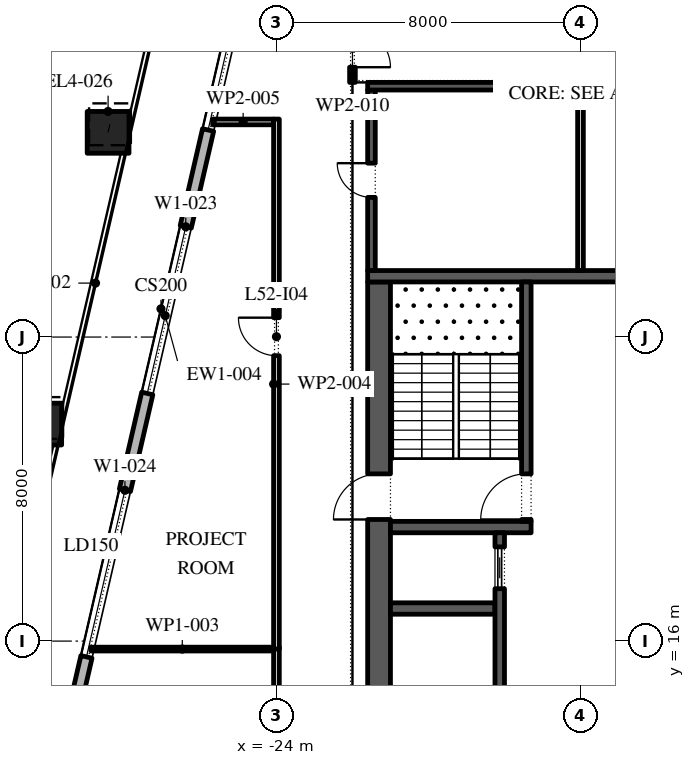
"""IFC4 building model, lengths in metres.
Left out: names, types, materials, properties, quantities, classifications, styles, units other than length and angle.
Written with IfcOpenShell. Run it as: python <this file> out.ifc"""

import sys

from ifc_helpers import new_model, si_unit, direction, frame, frame_2d, origin, origin_2d, place, context, subcontext, project, spatial, rectangle, extrude, element, fill, save


model = new_model("IFC4")
c1 = context("Model", 3, precision=1e-05, world=origin(), true_north=direction((0.0, 1.0)))
c2 = subcontext(c1, "Body", "Model", "MODEL_VIEW")
j1 = project(units=[si_unit("LENGTHUNIT", "METRE"), si_unit("PLANEANGLEUNIT", "RADIAN")], contexts=[c1])
p1 = place(None, origin())
s1 = spatial("IfcSite", under=j1, at=p1, CompositionType="ELEMENT")
p2 = place(p1, origin())
s2 = spatial("IfcBuilding", under=s1, at=p2, CompositionType="ELEMENT")
p3 = place(p2, frame((0.0, 0.0, 243.0)))
s3 = spatial("IfcBuildingStorey", under=s2, at=p3, CompositionType="ELEMENT", Elevation=243.0)
p4 = place(p3, frame((-28.43, 29.386, 0.0), z_axis=(0.011610223917, 0.050562525159, 0.998653410223), x_axis=(-0.974635787342, 0.223796966095, 0.0)))
e1 = element("IfcColumn", 1, at=p4, inside=s3, PredefinedType="COLUMN", context=c2, shape_type="SweptSolid", body=[
    extrude(rectangle(XDim=1.1, YDim=1.1, at=origin_2d()), origin(), (0.0, 0.0, 1.0), 4.206),
])
p5 = place(p3, frame((-30.202, 21.71, 0.0), z_axis=(0.00871280379, 0.037929739166, 0.999242424008), x_axis=(-0.974617095667, 0.223878352757, 0.0)))
e2 = element("IfcColumn", 2, at=p5, inside=s3, PredefinedType="COLUMN", context=c2, shape_type="SweptSolid", body=[
    extrude(rectangle(XDim=1.1, YDim=1.1, at=origin_2d()), origin(), (0.0, 0.0, 1.0), 4.203),
])
p6 = place(p3, frame((-21.359, 48.678, 0.0), z_axis=(0.0, 0.0, 1.0), x_axis=(-0.224949198343, -0.974370493275, 0.0)))
e3 = element("IfcWall", 3, at=p6, inside=s3, PredefinedType="STANDARD", context=c2, shape_type="SweptSolid", body=[
    extrude(rectangle(XDim=49.5, YDim=0.3, at=frame_2d((24.75, 0.0))), origin(), (0.0, 0.0, 1.0), 4.0),
])
p7 = place(p6, frame((1.157, 0.0, 0.45)))
e4 = element("IfcOpeningElement", 4, at=p7, cuts=e3, PredefinedType="OPENING", context=c2, shape_type="SweptSolid", body=[
    extrude(rectangle(XDim=4.5, YDim=3.05, at=frame_2d((2.25, 1.525))), frame((0.0, 0.16, 0.0), z_axis=(0.0, -1.0, 0.0), x_axis=(1.0, 0.0, 0.0)), (0.0, 0.0, 1.0), 0.32),
])
p8 = place(p6, frame((9.171, 0.0, 0.0)))
e5 = element("IfcOpeningElement", 5, at=p8, cuts=e3, PredefinedType="OPENING", context=c2, shape_type="SweptSolid", body=[
    extrude(rectangle(XDim=2.4, YDim=3.5, at=frame_2d((1.2, 1.75))), frame((0.0, 0.16, 0.0), z_axis=(0.0, -1.0, 0.0), x_axis=(1.0, 0.0, 0.0)), (0.0, 0.0, 1.0), 0.32),
])
p9 = place(p6, frame((15.236, 0.0, 0.45)))
e6 = element("IfcOpeningElement", 6, at=p9, cuts=e3, PredefinedType="OPENING", context=c2, shape_type="SweptSolid", body=[
    extrude(rectangle(XDim=4.5, YDim=3.05, at=frame_2d((2.25, 1.525))), frame((0.0, 0.16, 0.0), z_axis=(0.0, -1.0, 0.0), x_axis=(1.0, 0.0, 0.0)), (0.0, 0.0, 1.0), 0.32),
])
p10 = place(p6, frame((22.35, 0.0, 0.45)))
e7 = element("IfcOpeningElement", 7, at=p10, cuts=e3, PredefinedType="OPENING", context=c2, shape_type="SweptSolid", body=[
    extrude(rectangle(XDim=4.5, YDim=3.05, at=frame_2d((2.25, 1.525))), frame((0.0, 0.16, 0.0), z_axis=(0.0, -1.0, 0.0), x_axis=(1.0, 0.0, 0.0)), (0.0, 0.0, 1.0), 0.32),
])
p11 = place(p6, frame((29.464, 0.0, 0.45)))
e8 = element("IfcOpeningElement", 8, at=p11, cuts=e3, PredefinedType="OPENING", context=c2, shape_type="SweptSolid", body=[
    extrude(rectangle(XDim=4.5, YDim=3.05, at=frame_2d((2.25, 1.525))), frame((0.0, 0.16, 0.0), z_axis=(0.0, -1.0, 0.0), x_axis=(1.0, 0.0, 0.0)), (0.0, 0.0, 1.0), 0.32),
])
p12 = place(p6, frame((37.628, 0.0, 0.0)))
e9 = element("IfcOpeningElement", 9, at=p12, cuts=e3, PredefinedType="OPENING", context=c2, shape_type="SweptSolid", body=[
    extrude(rectangle(XDim=2.4, YDim=3.325, at=frame_2d((1.2, 1.663))), frame((0.0, 0.16, 0.0), z_axis=(0.0, -1.0, 0.0), x_axis=(1.0, 0.0, 0.0)), (0.0, 0.0, 1.0), 0.32),
])
p13 = place(p6, frame((43.693, 0.0, 0.45)))
e10 = element("IfcOpeningElement", 10, at=p13, cuts=e3, PredefinedType="OPENING", context=c2, shape_type="SweptSolid", body=[
    extrude(rectangle(XDim=4.5, YDim=2.825, at=frame_2d((2.25, 1.413))), frame((0.0, 0.16, 0.0), z_axis=(0.0, -1.0, 0.0), x_axis=(1.0, 0.0, 0.0)), (0.0, 0.0, 1.0), 0.32),
])
p14 = place(p3, frame((-21.3, -2.45, 0.0), z_axis=(0.0, 0.0, 1.0), x_axis=(0.0, 1.0, 0.0)))
e11 = element("IfcWall", 11, at=p14, inside=s3, PredefinedType="SHEAR", context=c2, shape_type="SweptSolid", body=[
    extrude(rectangle(XDim=27.9, YDim=0.6, at=frame_2d((13.95, 0.0))), origin(), (0.0, 0.0, 1.0), 4.0),
])
p15 = place(p14, frame((5.05, 0.0, 0.0)))
e12 = element("IfcOpeningElement", 12, at=p15, cuts=e11, PredefinedType="OPENING", context=c2, shape_type="SweptSolid", body=[
    extrude(rectangle(XDim=1.2, YDim=2.1, at=frame_2d((0.6, 1.05))), frame((0.0, 0.31, 0.0), z_axis=(0.0, -1.0, 0.0), x_axis=(1.0, 0.0, 0.0)), (0.0, 0.0, 1.0), 0.62),
])
p16 = place(p14, frame((21.65, 0.0, 0.0)))
e13 = element("IfcOpeningElement", 13, at=p16, cuts=e11, PredefinedType="OPENING", context=c2, shape_type="SweptSolid", body=[
    extrude(rectangle(XDim=1.2, YDim=2.1, at=frame_2d((0.6, 1.05))), frame((0.0, 0.31, 0.0), z_axis=(0.0, -1.0, 0.0), x_axis=(1.0, 0.0, 0.0)), (0.0, 0.0, 1.0), 0.62),
])
p17 = place(p3, frame((-21.6, 25.6, 0.0), z_axis=(0.0, 0.0, 1.0), x_axis=(1.0, 0.0, 0.0)))
e14 = element("IfcWall", 14, at=p17, inside=s3, PredefinedType="SHEAR", context=c2, shape_type="SweptSolid", body=[
    extrude(rectangle(XDim=11.2, YDim=0.3, at=frame_2d((5.6, 0.0))), origin(), (0.0, 0.0, 1.0), 4.0),
])
p18 = place(p3, frame((-21.0, 19.0, 0.0), z_axis=(0.0, 0.0, 1.0), x_axis=(1.0, 0.0, 0.0)))
e15 = element("IfcWall", 15, at=p18, inside=s3, PredefinedType="SHEAR", context=c2, shape_type="SweptSolid", body=[
    extrude(rectangle(XDim=3.7, YDim=0.3, at=frame_2d((1.85, 0.0))), origin(), (0.0, 0.0, 1.0), 4.0),
])
p19 = place(p3, frame((-17.425, 19.15, 0.0), z_axis=(0.0, 0.0, 1.0), x_axis=(0.0, 1.0, 0.0)))
e16 = element("IfcWall", 16, at=p19, inside=s3, PredefinedType="SHEAR", context=c2, shape_type="SweptSolid", body=[
    extrude(rectangle(XDim=6.3, YDim=0.25, at=frame_2d((3.15, 0.0))), origin(), (0.0, 0.0, 1.0), 4.0),
])
p20 = place(p19, frame((0.05, 0.0, 0.0)))
e17 = element("IfcOpeningElement", 17, at=p20, cuts=e16, PredefinedType="OPENING", context=c2, shape_type="SweptSolid", body=[
    extrude(rectangle(XDim=1.2, YDim=2.1, at=frame_2d((0.6, 1.05))), frame((0.0, 0.135, 0.0), z_axis=(0.0, -1.0, 0.0), x_axis=(1.0, 0.0, 0.0)), (0.0, 0.0, 1.0), 0.27),
])
p21 = place(p3, frame((-21.0, 16.857, 0.0), z_axis=(0.0, 0.0, 1.0), x_axis=(1.0, 0.0, 0.0)))
e18 = element("IfcWall", 18, at=p21, inside=s3, PredefinedType="SHEAR", context=c2, shape_type="SweptSolid", body=[
    extrude(rectangle(XDim=2.75, YDim=0.3, at=frame_2d((1.375, 0.0))), origin(), (0.0, 0.0, 1.0), 4.0),
])
p22 = place(p3, frame((-18.125, 4.15, 0.0), z_axis=(0.0, 0.0, 1.0), x_axis=(0.0, 1.0, 0.0)))
e19 = element("IfcWall", 19, at=p22, inside=s3, PredefinedType="SHEAR", context=c2, shape_type="SweptSolid", body=[
    extrude(rectangle(XDim=14.7, YDim=0.25, at=frame_2d((7.35, 0.0))), origin(), (0.0, 0.0, 1.0), 4.0),
])
p23 = place(p22, frame((3.246, 0.0, 0.0)))
e20 = element("IfcOpeningElement", 20, at=p23, cuts=e19, PredefinedType="OPENING", context=c2, shape_type="SweptSolid", body=[
    extrude(rectangle(XDim=0.9, YDim=2.1, at=frame_2d((0.45, 1.05))), frame((0.0, 0.135, 0.0), z_axis=(0.0, -1.0, 0.0), x_axis=(1.0, 0.0, 0.0)), (0.0, 0.0, 1.0), 0.27),
])
p24 = place(p22, frame((8.454, 0.0, 0.0)))
e21 = element("IfcOpeningElement", 21, at=p24, cuts=e19, PredefinedType="OPENING", context=c2, shape_type="SweptSolid", body=[
    extrude(rectangle(XDim=0.9, YDim=2.1, at=frame_2d((0.45, 1.05))), frame((0.0, 0.135, 0.0), z_axis=(0.0, -1.0, 0.0), x_axis=(1.0, 0.0, 0.0)), (0.0, 0.0, 1.0), 0.27),
])
p25 = place(p22, frame((0.371, 0.0, 0.0)))
e22 = element("IfcOpeningElement", 22, at=p25, cuts=e19, PredefinedType="OPENING", context=c2, shape_type="SweptSolid", body=[
    extrude(rectangle(XDim=1.1, YDim=2.1, at=frame_2d((0.55, 1.05))), frame((0.0, 0.135, 0.0), z_axis=(0.0, -1.0, 0.0), x_axis=(1.0, 0.0, 0.0)), (0.0, 0.0, 1.0), 0.27),
])
p26 = place(p22, frame((13.229, 0.0, 0.0)))
e23 = element("IfcOpeningElement", 23, at=p26, cuts=e19, PredefinedType="OPENING", context=c2, shape_type="SweptSolid", body=[
    extrude(rectangle(XDim=1.1, YDim=2.1, at=frame_2d((0.55, 1.05))), frame((0.0, 0.135, 0.0), z_axis=(0.0, -1.0, 0.0), x_axis=(1.0, 0.0, 0.0)), (0.0, 0.0, 1.0), 0.27),
])
p27 = place(p3, frame((-21.5, 25.75, 0.0), z_axis=(0.0, 0.0, 1.0), x_axis=(0.0, 1.0, 0.0)))
e24 = element("IfcWall", 24, at=p27, inside=s3, PredefinedType="SHEAR", context=c2, shape_type="SweptSolid", body=[
    extrude(rectangle(XDim=4.75, YDim=0.2, at=frame_2d((2.375, 0.0))), origin(), (0.0, 0.0, 1.0), 4.0),
])
p28 = place(p27, frame((1.925, 0.0, 0.0)))
e25 = element("IfcOpeningElement", 25, at=p28, cuts=e24, PredefinedType="OPENING", context=c2, shape_type="SweptSolid", body=[
    extrude(rectangle(XDim=0.9, YDim=2.1, at=frame_2d((0.45, 1.05))), frame((0.0, 0.11, 0.0), z_axis=(0.0, -1.0, 0.0), x_axis=(1.0, 0.0, 0.0)), (0.0, 0.0, 1.0), 0.22),
])
p29 = place(p3, frame((-21.6, 30.6, 0.0), z_axis=(0.0, 0.0, 1.0), x_axis=(1.0, 0.0, 0.0)))
e26 = element("IfcWall", 26, at=p29, inside=s3, PredefinedType="SHEAR", context=c2, shape_type="SweptSolid", body=[
    extrude(rectangle(XDim=11.2, YDim=0.2, at=frame_2d((5.6, 0.0))), origin(), (0.0, 0.0, 1.0), 4.0),
])
p30 = place(p3, frame((-16.0, 25.75, 0.0), z_axis=(0.0, 0.0, 1.0), x_axis=(0.0, 1.0, 0.0)))
e27 = element("IfcWall", 27, at=p30, inside=s3, PredefinedType="PARTITIONING", context=c2, shape_type="SweptSolid", body=[
    extrude(rectangle(XDim=4.75, YDim=0.15, at=frame_2d((2.375, 0.0))), origin(), (0.0, 0.0, 1.0), 4.0),
])
p31 = place(p3, frame((-24.0, -4.6, 0.0), z_axis=(0.0, 0.0, 1.0), x_axis=(0.0, 1.0, 0.0)))
e28 = element("IfcWall", 28, at=p31, inside=s3, PredefinedType="PARTITIONING", context=c2, shape_type="SweptSolid", body=[
    extrude(rectangle(XDim=20.44, YDim=0.15, at=frame_2d((10.22, 0.0))), origin(), (0.0, 0.0, 1.0), 4.0),
])
p32 = place(p31, frame((11.74, 0.0, 0.0)))
e29 = element("IfcOpeningElement", 29, at=p32, cuts=e28, PredefinedType="OPENING", context=c2, shape_type="SweptSolid", body=[
    extrude(rectangle(XDim=1.0, YDim=2.1, at=frame_2d((0.5, 1.05))), frame((0.0, 0.085, 0.0), z_axis=(0.0, -1.0, 0.0), x_axis=(1.0, 0.0, 0.0)), (0.0, 0.0, 1.0), 0.17),
])
p33 = place(p3, frame((-24.075, 15.79, 0.0), z_axis=(0.0, 0.0, 1.0), x_axis=(-1.0, 0.0, 0.0)))
e30 = element("IfcWall", 30, at=p33, inside=s3, PredefinedType="PARTITIONING", context=c2, shape_type="SweptSolid", body=[
    extrude(rectangle(XDim=4.805, YDim=0.1, at=frame_2d((2.402, 0.0))), origin(), (0.0, 0.0, 1.0), 4.0),
])
p34 = place(p3, frame((-24.0, 15.79, 0.0), z_axis=(0.0, 0.0, 1.0), x_axis=(0.0, 1.0, 0.0)))
e31 = element("IfcWall", 31, at=p34, inside=s3, PredefinedType="PARTITIONING", context=c2, shape_type="SweptSolid", body=[
    extrude(rectangle(XDim=13.945, YDim=0.15, at=frame_2d((6.973, 0.0))), origin(), (0.0, 0.0, 1.0), 4.0),
])
p35 = place(p34, frame((7.72, 0.0, 0.0)))
e32 = element("IfcOpeningElement", 32, at=p35, cuts=e31, PredefinedType="OPENING", context=c2, shape_type="SweptSolid", body=[
    extrude(rectangle(XDim=1.0, YDim=2.1, at=frame_2d((0.5, 1.05))), frame((0.0, 0.085, 0.0), z_axis=(0.0, -1.0, 0.0), x_axis=(1.0, 0.0, 0.0)), (0.0, 0.0, 1.0), 0.17),
])
p36 = place(p3, frame((-24.075, 29.66, 0.0), z_axis=(0.0, 0.0, 1.0), x_axis=(-1.0, 0.0, 0.0)))
e33 = element("IfcWall", 33, at=p36, inside=s3, PredefinedType="PARTITIONING", context=c2, shape_type="SweptSolid", body=[
    extrude(rectangle(XDim=1.603, YDim=0.15, at=frame_2d((0.802, 0.0))), origin(), (0.0, 0.0, 1.0), 4.0),
])
p37 = place(p3, frame((-22.0, 32.625, 0.0), z_axis=(0.0, 0.0, 1.0), x_axis=(0.0, -1.0, 0.0)))
e34 = element("IfcWall", 34, at=p37, inside=s3, PredefinedType="PARTITIONING", context=c2, shape_type="SweptSolid", body=[
    extrude(rectangle(XDim=1.925, YDim=0.15, at=frame_2d((0.962, 0.0))), origin(), (0.0, 0.0, 1.0), 4.0),
])
p38 = place(p37, frame((0.525, 0.0, 0.0)))
e35 = element("IfcOpeningElement", 35, at=p38, cuts=e34, PredefinedType="OPENING", context=c2, shape_type="SweptSolid", body=[
    extrude(rectangle(XDim=1.0, YDim=2.1, at=frame_2d((0.5, 1.05))), frame((0.0, 0.085, 0.0), z_axis=(0.0, -1.0, 0.0), x_axis=(1.0, 0.0, 0.0)), (0.0, 0.0, 1.0), 0.17),
])
p39 = place(p9, origin())
e36 = element("IfcWindow", 36, at=p39, inside=s3, PartitioningType="DOUBLE_PANEL_VERTICAL", PredefinedType="WINDOW", context=c2, shape_type="SweptSolid", body=[
    extrude(rectangle(XDim=4.5, YDim=3.05, at=frame_2d((2.25, 1.525))), frame((0.0, 0.03, 0.0), z_axis=(0.0, -1.0, 0.0), x_axis=(1.0, 0.0, 0.0)), (0.0, 0.0, 1.0), 0.06),
])
fill(e6, e36)
p40 = place(p10, origin())
e37 = element("IfcWindow", 37, at=p40, inside=s3, PartitioningType="DOUBLE_PANEL_VERTICAL", PredefinedType="WINDOW", context=c2, shape_type="SweptSolid", body=[
    extrude(rectangle(XDim=4.5, YDim=3.05, at=frame_2d((2.25, 1.525))), frame((0.0, 0.03, 0.0), z_axis=(0.0, -1.0, 0.0), x_axis=(1.0, 0.0, 0.0)), (0.0, 0.0, 1.0), 0.06),
])
fill(e7, e37)
p41 = place(p11, origin())
e38 = element("IfcWindow", 38, at=p41, inside=s3, PartitioningType="DOUBLE_PANEL_VERTICAL", PredefinedType="WINDOW", context=c2, shape_type="SweptSolid", body=[
    extrude(rectangle(XDim=4.5, YDim=3.05, at=frame_2d((2.25, 1.525))), frame((0.0, 0.03, 0.0), z_axis=(0.0, -1.0, 0.0), x_axis=(1.0, 0.0, 0.0)), (0.0, 0.0, 1.0), 0.06),
])
fill(e8, e38)
p42 = place(p26, origin())
e39 = element("IfcDoor", 39, at=p42, inside=s3, OperationType="SLIDING_TO_LEFT", PredefinedType="DOOR", context=c2, shape_type="SweptSolid", body=[
    extrude(rectangle(XDim=1.1, YDim=2.1, at=frame_2d((0.55, 1.05))), frame((0.0, 0.025, 0.0), z_axis=(0.0, -1.0, 0.0), x_axis=(1.0, 0.0, 0.0)), (0.0, 0.0, 1.0), 0.05),
])
fill(e23, e39)
p43 = place(p20, origin())
e40 = element("IfcDoor", 40, at=p43, inside=s3, OperationType="SINGLE_SWING_RIGHT", PredefinedType="DOOR", context=c2, shape_type="SweptSolid", body=[
    extrude(rectangle(XDim=1.2, YDim=2.1, at=frame_2d((0.6, 1.05))), frame((0.0, 0.025, 0.0), z_axis=(0.0, -1.0, 0.0), x_axis=(1.0, 0.0, 0.0)), (0.0, 0.0, 1.0), 0.05),
])
fill(e17, e40)
p44 = place(p16, origin())
e41 = element("IfcDoor", 41, at=p44, inside=s3, OperationType="SINGLE_SWING_RIGHT", PredefinedType="DOOR", context=c2, shape_type="SweptSolid", body=[
    extrude(rectangle(XDim=1.2, YDim=2.1, at=frame_2d((0.6, 1.05))), frame((0.0, 0.025, 0.0), z_axis=(0.0, -1.0, 0.0), x_axis=(1.0, 0.0, 0.0)), (0.0, 0.0, 1.0), 0.05),
])
fill(e13, e41)
p45 = place(p28, origin())
e42 = element("IfcDoor", 42, at=p45, inside=s3, OperationType="SINGLE_SWING_LEFT", PredefinedType="DOOR", context=c2, shape_type="SweptSolid", body=[
    extrude(rectangle(XDim=0.9, YDim=2.1, at=frame_2d((0.45, 1.05))), frame((0.0, -0.05, 0.0), z_axis=(0.0, -1.0, 0.0), x_axis=(1.0, 0.0, 0.0)), (0.0, 0.0, 1.0), 0.05),
])
fill(e25, e42)
p46 = place(p35, origin())
e43 = element("IfcDoor", 43, at=p46, inside=s3, OperationType="SINGLE_SWING_LEFT", PredefinedType="DOOR", context=c2, shape_type="SweptSolid", body=[
    extrude(rectangle(XDim=1.0, YDim=2.1, at=frame_2d((0.5, 1.05))), frame((0.0, 0.025, 0.0), z_axis=(0.0, -1.0, 0.0), x_axis=(1.0, 0.0, 0.0)), (0.0, 0.0, 1.0), 0.05),
])
fill(e32, e43)
p47 = place(p38, origin())
e44 = element("IfcDoor", 44, at=p47, inside=s3, OperationType="SINGLE_SWING_LEFT", PredefinedType="DOOR", context=c2, shape_type="SweptSolid", body=[
    extrude(rectangle(XDim=1.0, YDim=2.1, at=frame_2d((0.5, 1.05))), frame((0.0, 0.025, 0.0), z_axis=(0.0, -1.0, 0.0), x_axis=(1.0, 0.0, 0.0)), (0.0, 0.0, 1.0), 0.05),
])
fill(e35, e44)
save(model, sys.argv[1])
